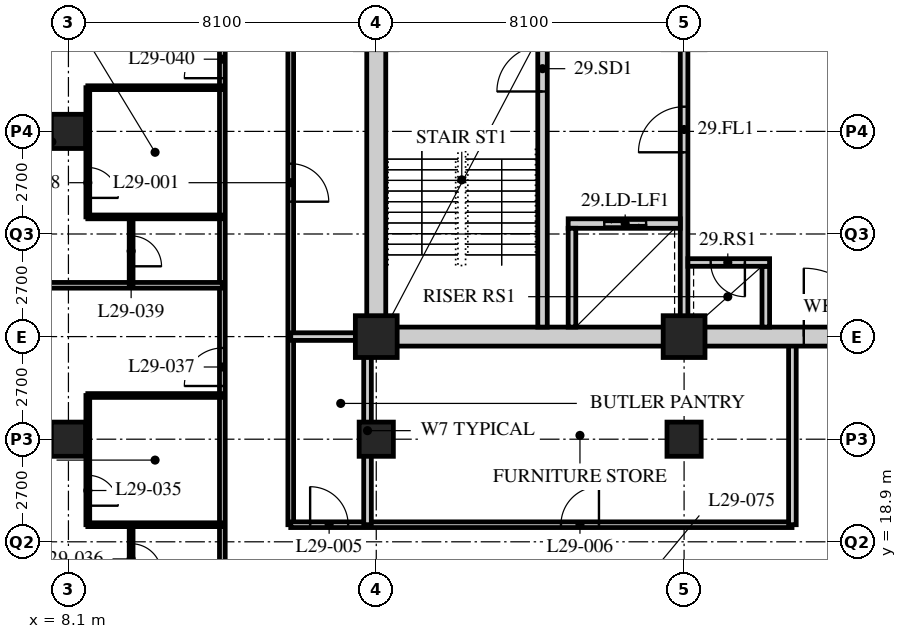
"""IFC4 building model, lengths in metres.
Left out: names, types, materials, properties, quantities, classifications, styles, units other than length and angle.
Written with IfcOpenShell. Run it as: python <this file> out.ifc"""

import sys

from ifc_helpers import new_model, si_unit, direction, frame, frame_2d, origin, origin_2d, place, context, subcontext, project, spatial, rectangle, hollow_rectangle, extrude, element, fill, save


model = new_model("IFC4")
c1 = context("Model", 3, precision=1e-05, world=origin(), true_north=direction((0.0, 1.0)))
c2 = subcontext(c1, "Body", "Model", "MODEL_VIEW")
j1 = project(units=[si_unit("LENGTHUNIT", "METRE"), si_unit("PLANEANGLEUNIT", "RADIAN")], contexts=[c1])
p1 = place(None, origin())
s1 = spatial("IfcSite", under=j1, at=p1, CompositionType="ELEMENT")
p2 = place(p1, origin())
s2 = spatial("IfcBuilding", under=s1, at=p2, CompositionType="ELEMENT")
p3 = place(p2, frame((0.0, 0.0, 117.0)))
s3 = spatial("IfcBuildingStorey", under=s2, at=p3, CompositionType="ELEMENT", Elevation=117.0)
for number, where, z_axis, x_axis in (
    (1, (8.1, 21.6, 0.0), (0.0, 0.0, 1.0), (1.0, 0.0, 0.0)),
    (2, (8.1, 29.7, 0.0), (0.0, 0.0, 1.0), (1.0, 0.0, 0.0)),
    (3, (16.2, 21.6, 0.0), (0.0, 0.0, 1.0), (1.0, 0.0, 0.0)),
):
    element("IfcColumn", number, at=place(p3, frame(where, z_axis=z_axis, x_axis=x_axis)), inside=s3, PredefinedType="COLUMN", context=c2, shape_type="SweptSolid", body=[
        extrude(hollow_rectangle(XDim=0.9, YDim=0.9, WallThickness=0.09, at=origin_2d()), origin(), (0.0, 0.0, 1.0), 3.4),
    ])
p4 = place(p3, frame((16.2, 24.3, 0.0), z_axis=(0.0, 0.0, 1.0), x_axis=(1.0, 0.0, 0.0)))
e4 = element("IfcColumn", 4, at=p4, inside=s3, PredefinedType="COLUMN", context=c2, shape_type="SweptSolid", body=[
    extrude(hollow_rectangle(XDim=1.1, YDim=1.1, WallThickness=0.1, at=origin_2d()), origin(), (0.0, 0.0, 1.0), 3.4),
])
p5 = place(p3, frame((24.3, 21.6, 0.0), z_axis=(0.0, 0.0, 1.0), x_axis=(1.0, 0.0, 0.0)))
e5 = element("IfcColumn", 5, at=p5, inside=s3, PredefinedType="COLUMN", context=c2, shape_type="SweptSolid", body=[
    extrude(hollow_rectangle(XDim=0.9, YDim=0.9, WallThickness=0.09, at=origin_2d()), origin(), (0.0, 0.0, 1.0), 3.4),
])
p6 = place(p3, frame((24.3, 24.3, 0.0), z_axis=(0.0, 0.0, 1.0), x_axis=(1.0, 0.0, 0.0)))
e6 = element("IfcColumn", 6, at=p6, inside=s3, PredefinedType="COLUMN", context=c2, shape_type="SweptSolid", body=[
    extrude(hollow_rectangle(XDim=1.1, YDim=1.1, WallThickness=0.1, at=origin_2d()), origin(), (0.0, 0.0, 1.0), 3.4),
])
p7 = place(p3, frame((12.15, 17.55, 0.0), z_axis=(0.0, 0.0, 1.0), x_axis=(0.0, 1.0, 0.0)))
e7 = element("IfcWall", 7, at=p7, inside=s3, PredefinedType="PARTITIONING", context=c2, shape_type="SweptSolid", body=[
    extrude(rectangle(XDim=28.35, YDim=0.15, at=frame_2d((14.175, 0.0))), origin(), (0.0, 0.0, 1.0), 3.19),
])
p8 = place(p7, frame((5.45, 0.0, 0.0)))
e8 = element("IfcOpeningElement", 8, at=p8, cuts=e7, PredefinedType="OPENING", context=c2, shape_type="SweptSolid", body=[
    extrude(rectangle(XDim=1.0, YDim=2.1, at=frame_2d((0.5, 1.05))), frame((0.0, 0.085, 0.0), z_axis=(0.0, -1.0, 0.0), x_axis=(1.0, 0.0, 0.0)), (0.0, 0.0, 1.0), 0.17),
])
p9 = place(p7, frame((13.55, 0.0, 0.0)))
e9 = element("IfcOpeningElement", 9, at=p9, cuts=e7, PredefinedType="OPENING", context=c2, shape_type="SweptSolid", body=[
    extrude(rectangle(XDim=1.0, YDim=2.1, at=frame_2d((0.5, 1.05))), frame((0.0, 0.085, 0.0), z_axis=(0.0, -1.0, 0.0), x_axis=(1.0, 0.0, 0.0)), (0.0, 0.0, 1.0), 0.17),
])
p10 = place(p7, frame((21.65, 0.0, 0.0)))
e10 = element("IfcOpeningElement", 10, at=p10, cuts=e7, PredefinedType="OPENING", context=c2, shape_type="SweptSolid", body=[
    extrude(rectangle(XDim=1.0, YDim=2.1, at=frame_2d((0.5, 1.05))), frame((0.0, 0.085, 0.0), z_axis=(0.0, -1.0, 0.0), x_axis=(1.0, 0.0, 0.0)), (0.0, 0.0, 1.0), 0.17),
])
p11 = place(p7, frame((26.75, 0.0, 0.0)))
e11 = element("IfcOpeningElement", 11, at=p11, cuts=e7, PredefinedType="OPENING", context=c2, shape_type="SweptSolid", body=[
    extrude(rectangle(XDim=1.0, YDim=2.1, at=frame_2d((0.5, 1.05))), frame((0.0, 0.085, 0.0), z_axis=(0.0, -1.0, 0.0), x_axis=(1.0, 0.0, 0.0)), (0.0, 0.0, 1.0), 0.17),
])
p12 = place(p3, frame((13.95, 44.1, 0.0), z_axis=(0.0, 0.0, 1.0), x_axis=(0.0, -1.0, 0.0)))
e12 = element("IfcWall", 12, at=p12, inside=s3, PredefinedType="PARTITIONING", context=c2, shape_type="SweptSolid", body=[
    extrude(rectangle(XDim=24.75, YDim=0.15, at=frame_2d((12.375, 0.0))), origin(), (0.0, 0.0, 1.0), 3.19),
])
p13 = place(p12, frame((15.25, 0.0, 0.0)))
e13 = element("IfcOpeningElement", 13, at=p13, cuts=e12, PredefinedType="OPENING", context=c2, shape_type="SweptSolid", body=[
    extrude(rectangle(XDim=1.0, YDim=2.1, at=frame_2d((0.5, 1.05))), frame((0.0, 0.085, 0.0), z_axis=(0.0, -1.0, 0.0), x_axis=(1.0, 0.0, 0.0)), (0.0, 0.0, 1.0), 0.17),
])
p14 = place(p12, frame((7.15, 0.0, 0.0)))
e14 = element("IfcOpeningElement", 14, at=p14, cuts=e12, PredefinedType="OPENING", context=c2, shape_type="SweptSolid", body=[
    extrude(rectangle(XDim=1.0, YDim=2.1, at=frame_2d((0.5, 1.05))), frame((0.0, 0.085, 0.0), z_axis=(0.0, -1.0, 0.0), x_axis=(1.0, 0.0, 0.0)), (0.0, 0.0, 1.0), 0.17),
])
p15 = place(p3, frame((13.95, 19.35, 0.0), z_axis=(0.0, 0.0, 1.0), x_axis=(1.0, 0.0, 0.0)))
e15 = element("IfcWall", 15, at=p15, inside=s3, PredefinedType="PARTITIONING", context=c2, shape_type="SweptSolid", body=[
    extrude(rectangle(XDim=13.19, YDim=0.15, at=frame_2d((6.595, 0.0))), origin(), (0.0, 0.0, 1.0), 3.19),
])
p16 = place(p15, frame((0.51, 0.0, 0.0)))
e16 = element("IfcOpeningElement", 16, at=p16, cuts=e15, PredefinedType="OPENING", context=c2, shape_type="SweptSolid", body=[
    extrude(rectangle(XDim=1.0, YDim=2.1, at=frame_2d((0.5, 1.05))), frame((0.0, 0.085, 0.0), z_axis=(0.0, -1.0, 0.0), x_axis=(1.0, 0.0, 0.0)), (0.0, 0.0, 1.0), 0.17),
])
p17 = place(p15, frame((7.11, 0.0, 0.0)))
e17 = element("IfcOpeningElement", 17, at=p17, cuts=e15, PredefinedType="OPENING", context=c2, shape_type="SweptSolid", body=[
    extrude(rectangle(XDim=1.0, YDim=2.1, at=frame_2d((0.5, 1.05))), frame((0.0, 0.085, 0.0), z_axis=(0.0, -1.0, 0.0), x_axis=(1.0, 0.0, 0.0)), (0.0, 0.0, 1.0), 0.17),
])
p18 = place(p3, frame((15.97, 19.35, 0.0), z_axis=(0.0, 0.0, 1.0), x_axis=(0.0, 1.0, 0.0)))
e18 = element("IfcWall", 18, at=p18, inside=s3, PredefinedType="SOLIDWALL", context=c2, shape_type="SweptSolid", body=[
    extrude(rectangle(XDim=4.95, YDim=0.2, at=frame_2d((2.475, 0.0))), origin(), (0.0, 0.0, 1.0), 2.49),
])
p19 = place(p3, frame((27.15, 19.35, 0.0), z_axis=(0.0, 0.0, 1.0), x_axis=(0.0, 1.0, 0.0)))
e19 = element("IfcWall", 19, at=p19, inside=s3, PredefinedType="SOLIDWALL", context=c2, shape_type="SweptSolid", body=[
    extrude(rectangle(XDim=4.95, YDim=0.2, at=frame_2d((2.475, 0.0))), origin(), (0.0, 0.0, 1.0), 3.19),
])
p20 = place(p3, frame((13.95, 24.3, 0.0), z_axis=(0.0, 0.0, 1.0), x_axis=(1.0, 0.0, 0.0)))
e20 = element("IfcWall", 20, at=p20, inside=s3, PredefinedType="SOLIDWALL", context=c2, shape_type="SweptSolid", body=[
    extrude(rectangle(XDim=2.25, YDim=0.2, at=frame_2d((1.125, 0.0))), origin(), (0.0, 0.0, 1.0), 3.19),
])
p21 = place(p3, frame((8.61, 19.35, 0.0), z_axis=(0.0, 0.0, 1.0), x_axis=(0.0, 1.0, 0.0)))
e21 = element("IfcWall", 21, at=p21, inside=s3, PredefinedType="PARTITIONING", context=c2, shape_type="SweptSolid", body=[
    extrude(rectangle(XDim=3.4, YDim=0.1, at=frame_2d((1.7, 0.0))), origin(), (0.0, 0.0, 1.0), 3.19),
])
p22 = place(p21, frame((0.5, 0.0, 0.0)))
e22 = element("IfcOpeningElement", 22, at=p22, cuts=e21, PredefinedType="OPENING", context=c2, shape_type="SweptSolid", body=[
    extrude(rectangle(XDim=0.8, YDim=2.1, at=frame_2d((0.4, 1.05))), frame((0.0, 0.06, 0.0), z_axis=(0.0, -1.0, 0.0), x_axis=(1.0, 0.0, 0.0)), (0.0, 0.0, 1.0), 0.12),
])
p23 = place(p3, frame((9.75, 17.55, 0.0), z_axis=(0.0, 0.0, 1.0), x_axis=(0.0, 1.0, 0.0)))
e23 = element("IfcWall", 23, at=p23, inside=s3, PredefinedType="PARTITIONING", context=c2, shape_type="SweptSolid", body=[
    extrude(rectangle(XDim=1.8, YDim=0.1, at=frame_2d((0.9, 0.0))), origin(), (0.0, 0.0, 1.0), 3.19),
])
p24 = place(p23, frame((0.5, 0.0, 0.0)))
e24 = element("IfcOpeningElement", 24, at=p24, cuts=e23, PredefinedType="OPENING", context=c2, shape_type="SweptSolid", body=[
    extrude(rectangle(XDim=0.8, YDim=2.1, at=frame_2d((0.4, 1.05))), frame((0.0, 0.06, 0.0), z_axis=(0.0, -1.0, 0.0), x_axis=(1.0, 0.0, 0.0)), (0.0, 0.0, 1.0), 0.12),
])
for number, where, z_axis, x_axis in (
    (25, (12.15, 19.35, 0.0), (0.0, 0.0, 1.0), (-1.0, 0.0, 0.0)),
    (26, (12.15, 22.75, 0.0), (0.0, 0.0, 1.0), (-1.0, 0.0, 0.0)),
):
    element("IfcWall", number, at=place(p3, frame(where, z_axis=z_axis, x_axis=x_axis)), inside=s3, PredefinedType="PARTITIONING", context=c2, shape_type="SweptSolid", body=[
        extrude(rectangle(XDim=3.54, YDim=0.1, at=frame_2d((1.77, 0.0))), origin(), (0.0, 0.0, 1.0), 3.19),
    ])
p25 = place(p3, frame((12.15, 25.65, 0.0), z_axis=(0.0, 0.0, 1.0), x_axis=(-1.0, 0.0, 0.0)))
e27 = element("IfcWall", 27, at=p25, inside=s3, PredefinedType="PARTITIONING", context=c2, shape_type="SweptSolid", body=[
    extrude(rectangle(XDim=11.85, YDim=0.15, at=frame_2d((5.925, 0.0))), origin(), (0.0, 0.0, 1.0), 3.19),
])
p26 = place(p3, frame((8.61, 27.45, 0.0), z_axis=(0.0, 0.0, 1.0), x_axis=(0.0, 1.0, 0.0)))
e28 = element("IfcWall", 28, at=p26, inside=s3, PredefinedType="PARTITIONING", context=c2, shape_type="SweptSolid", body=[
    extrude(rectangle(XDim=3.4, YDim=0.1, at=frame_2d((1.7, 0.0))), origin(), (0.0, 0.0, 1.0), 3.19),
])
p27 = place(p26, frame((0.5, 0.0, 0.0)))
e29 = element("IfcOpeningElement", 29, at=p27, cuts=e28, PredefinedType="OPENING", context=c2, shape_type="SweptSolid", body=[
    extrude(rectangle(XDim=0.8, YDim=2.1, at=frame_2d((0.4, 1.05))), frame((0.0, 0.06, 0.0), z_axis=(0.0, -1.0, 0.0), x_axis=(1.0, 0.0, 0.0)), (0.0, 0.0, 1.0), 0.12),
])
p28 = place(p3, frame((9.75, 25.65, 0.0), z_axis=(0.0, 0.0, 1.0), x_axis=(0.0, 1.0, 0.0)))
e30 = element("IfcWall", 30, at=p28, inside=s3, PredefinedType="PARTITIONING", context=c2, shape_type="SweptSolid", body=[
    extrude(rectangle(XDim=1.8, YDim=0.1, at=frame_2d((0.9, 0.0))), origin(), (0.0, 0.0, 1.0), 3.19),
])
p29 = place(p28, frame((0.5, 0.0, 0.0)))
e31 = element("IfcOpeningElement", 31, at=p29, cuts=e30, PredefinedType="OPENING", context=c2, shape_type="SweptSolid", body=[
    extrude(rectangle(XDim=0.8, YDim=2.1, at=frame_2d((0.4, 1.05))), frame((0.0, 0.06, 0.0), z_axis=(0.0, -1.0, 0.0), x_axis=(1.0, 0.0, 0.0)), (0.0, 0.0, 1.0), 0.12),
])
for number, where, z_axis, x_axis in (
    (32, (12.15, 27.45, 0.0), (0.0, 0.0, 1.0), (-1.0, 0.0, 0.0)),
    (33, (12.15, 30.85, 0.0), (0.0, 0.0, 1.0), (-1.0, 0.0, 0.0)),
):
    element("IfcWall", number, at=place(p3, frame(where, z_axis=z_axis, x_axis=x_axis)), inside=s3, PredefinedType="PARTITIONING", context=c2, shape_type="SweptSolid", body=[
        extrude(rectangle(XDim=3.54, YDim=0.1, at=frame_2d((1.77, 0.0))), origin(), (0.0, 0.0, 1.0), 3.19),
    ])
p30 = place(p3, frame((15.95, 24.3, 0.0), z_axis=(0.0, 0.0, 1.0), x_axis=(1.0, 0.0, 0.0)))
e34 = element("IfcWall", 34, at=p30, inside=s3, PredefinedType="SOLIDWALL", context=c2, shape_type="SweptSolid", body=[
    extrude(rectangle(XDim=24.8, YDim=0.5, at=frame_2d((12.4, 0.0))), origin(), (0.0, 0.0, 1.0), 2.54),
])
p31 = place(p30, frame((11.5, 0.0, 0.0)))
e35 = element("IfcOpeningElement", 35, at=p31, cuts=e34, PredefinedType="OPENING", context=c2, shape_type="SweptSolid", body=[
    extrude(rectangle(XDim=1.8, YDim=2.4, at=frame_2d((0.9, 1.2))), frame((0.0, 0.26, 0.0), z_axis=(0.0, -1.0, 0.0), x_axis=(1.0, 0.0, 0.0)), (0.0, 0.0, 1.0), 0.52),
])
p32 = place(p3, frame((16.2, 24.55, 0.0), z_axis=(0.0, 0.0, 1.0), x_axis=(0.0, 1.0, 0.0)))
e36 = element("IfcWall", 36, at=p32, inside=s3, PredefinedType="SOLIDWALL", context=c2, shape_type="SweptSolid", body=[
    extrude(rectangle(XDim=15.7, YDim=0.5, at=frame_2d((7.85, 0.0))), origin(), (0.0, 0.0, 1.0), 2.578),
])
p33 = place(p3, frame((24.3, 24.55, 0.0), z_axis=(0.0, 0.0, 1.0), x_axis=(0.0, 1.0, 0.0)))
e37 = element("IfcWall", 37, at=p33, inside=s3, PredefinedType="SOLIDWALL", context=c2, shape_type="SweptSolid", body=[
    extrude(rectangle(XDim=7.75, YDim=0.2, at=frame_2d((3.875, 0.0))), origin(), (0.0, 0.0, 1.0), 2.578),
])
p34 = place(p33, frame((4.6, 0.0, 0.0)))
e38 = element("IfcOpeningElement", 38, at=p34, cuts=e37, PredefinedType="OPENING", context=c2, shape_type="SweptSolid", body=[
    extrude(rectangle(XDim=1.2, YDim=2.1, at=frame_2d((0.6, 1.05))), frame((0.0, 0.11, 0.0), z_axis=(0.0, -1.0, 0.0), x_axis=(1.0, 0.0, 0.0)), (0.0, 0.0, 1.0), 0.22),
])
p35 = place(p3, frame((20.575, 24.55, 0.0), z_axis=(0.0, 0.0, 1.0), x_axis=(0.0, 1.0, 0.0)))
e39 = element("IfcWall", 39, at=p35, inside=s3, PredefinedType="SOLIDWALL", context=c2, shape_type="SweptSolid", body=[
    extrude(rectangle(XDim=7.75, YDim=0.25, at=frame_2d((3.875, 0.0))), origin(), (0.0, 0.0, 1.0), 3.19),
])
p36 = place(p35, frame((6.2, 0.0, 0.0)))
e40 = element("IfcOpeningElement", 40, at=p36, cuts=e39, PredefinedType="OPENING", context=c2, shape_type="SweptSolid", body=[
    extrude(rectangle(XDim=1.2, YDim=2.1, at=frame_2d((0.6, 1.05))), frame((0.0, 0.135, 0.0), z_axis=(0.0, -1.0, 0.0), x_axis=(1.0, 0.0, 0.0)), (0.0, 0.0, 1.0), 0.27),
])
p37 = place(p3, frame((21.25, 27.275, 0.0), z_axis=(0.0, 0.0, 1.0), x_axis=(1.0, 0.0, 0.0)))
e41 = element("IfcWall", 41, at=p37, inside=s3, PredefinedType="SOLIDWALL", context=c2, shape_type="SweptSolid", body=[
    extrude(rectangle(XDim=2.95, YDim=0.25, at=frame_2d((1.475, 0.0))), origin(), (0.0, 0.0, 1.0), 3.19),
])
p38 = place(p37, frame((0.95, 0.0, 0.0)))
e42 = element("IfcOpeningElement", 42, at=p38, cuts=e41, PredefinedType="OPENING", context=c2, shape_type="SweptSolid", body=[
    extrude(rectangle(XDim=1.1, YDim=2.4, at=frame_2d((0.55, 1.2))), frame((0.0, 0.135, 0.0), z_axis=(0.0, -1.0, 0.0), x_axis=(1.0, 0.0, 0.0)), (0.0, 0.0, 1.0), 0.27),
])
p39 = place(p3, frame((21.35, 24.55, 0.0), z_axis=(0.0, 0.0, 1.0), x_axis=(0.0, 1.0, 0.0)))
e43 = element("IfcWall", 43, at=p39, inside=s3, PredefinedType="SOLIDWALL", context=c2, shape_type="SweptSolid", body=[
    extrude(rectangle(XDim=2.6, YDim=0.2, at=frame_2d((1.3, 0.0))), origin(), (0.0, 0.0, 1.0), 3.19),
])
p40 = place(p3, frame((26.45, 24.55, 0.0), z_axis=(0.0, 0.0, 1.0), x_axis=(0.0, 1.0, 0.0)))
e44 = element("IfcWall", 44, at=p40, inside=s3, PredefinedType="SOLIDWALL", context=c2, shape_type="SweptSolid", body=[
    extrude(rectangle(XDim=1.6, YDim=0.2, at=frame_2d((0.8, 0.0))), origin(), (0.0, 0.0, 1.0), 3.19),
])
p41 = place(p3, frame((24.4, 26.25, 0.0), z_axis=(0.0, 0.0, 1.0), x_axis=(1.0, 0.0, 0.0)))
e45 = element("IfcWall", 45, at=p41, inside=s3, PredefinedType="SOLIDWALL", context=c2, shape_type="SweptSolid", body=[
    extrude(rectangle(XDim=2.15, YDim=0.2, at=frame_2d((1.075, 0.0))), origin(), (0.0, 0.0, 1.0), 3.19),
])
p42 = place(p41, frame((0.6, 0.0, 0.0)))
e46 = element("IfcOpeningElement", 46, at=p42, cuts=e45, PredefinedType="OPENING", context=c2, shape_type="SweptSolid", body=[
    extrude(rectangle(XDim=0.9, YDim=2.1, at=frame_2d((0.45, 1.05))), frame((0.0, 0.11, 0.0), z_axis=(0.0, -1.0, 0.0), x_axis=(1.0, 0.0, 0.0)), (0.0, 0.0, 1.0), 0.22),
])
p43 = place(p13, origin())
e47 = element("IfcDoor", 47, at=p43, inside=s3, OperationType="SINGLE_SWING_RIGHT", PredefinedType="DOOR", context=c2, shape_type="SweptSolid", body=[
    extrude(rectangle(XDim=1.0, YDim=2.1, at=frame_2d((0.5, 1.05))), frame((0.0, 0.025, 0.0), z_axis=(0.0, -1.0, 0.0), x_axis=(1.0, 0.0, 0.0)), (0.0, 0.0, 1.0), 0.05),
])
fill(e13, e47)
p44 = place(p16, origin())
e48 = element("IfcDoor", 48, at=p44, inside=s3, OperationType="SINGLE_SWING_LEFT", PredefinedType="DOOR", context=c2, shape_type="SweptSolid", body=[
    extrude(rectangle(XDim=1.0, YDim=2.1, at=frame_2d((0.5, 1.05))), frame((0.0, 0.025, 0.0), z_axis=(0.0, -1.0, 0.0), x_axis=(1.0, 0.0, 0.0)), (0.0, 0.0, 1.0), 0.05),
])
fill(e16, e48)
p45 = place(p17, origin())
e49 = element("IfcDoor", 49, at=p45, inside=s3, OperationType="SINGLE_SWING_RIGHT", PredefinedType="DOOR", context=c2, shape_type="SweptSolid", body=[
    extrude(rectangle(XDim=1.0, YDim=2.1, at=frame_2d((0.5, 1.05))), frame((0.0, 0.025, 0.0), z_axis=(0.0, -1.0, 0.0), x_axis=(1.0, 0.0, 0.0)), (0.0, 0.0, 1.0), 0.05),
])
fill(e17, e49)
p46 = place(p22, origin())
e50 = element("IfcDoor", 50, at=p46, inside=s3, OperationType="SINGLE_SWING_RIGHT", PredefinedType="DOOR", context=c2, shape_type="SweptSolid", body=[
    extrude(rectangle(XDim=0.8, YDim=2.1, at=frame_2d((0.4, 1.05))), frame((0.0, 0.025, 0.0), z_axis=(0.0, -1.0, 0.0), x_axis=(1.0, 0.0, 0.0)), (0.0, 0.0, 1.0), 0.05),
])
fill(e22, e50)
p47 = place(p24, origin())
e51 = element("IfcDoor", 51, at=p47, inside=s3, OperationType="SINGLE_SWING_RIGHT", PredefinedType="DOOR", context=c2, shape_type="SweptSolid", body=[
    extrude(rectangle(XDim=0.8, YDim=2.1, at=frame_2d((0.4, 1.05))), frame((0.0, 0.025, 0.0), z_axis=(0.0, -1.0, 0.0), x_axis=(1.0, 0.0, 0.0)), (0.0, 0.0, 1.0), 0.05),
])
fill(e24, e51)
p48 = place(p8, origin())
e52 = element("IfcDoor", 52, at=p48, inside=s3, OperationType="SINGLE_SWING_LEFT", PredefinedType="DOOR", context=c2, shape_type="SweptSolid", body=[
    extrude(rectangle(XDim=1.0, YDim=2.1, at=frame_2d((0.5, 1.05))), frame((0.0, 0.025, 0.0), z_axis=(0.0, -1.0, 0.0), x_axis=(1.0, 0.0, 0.0)), (0.0, 0.0, 1.0), 0.05),
])
fill(e8, e52)
p49 = place(p27, origin())
e53 = element("IfcDoor", 53, at=p49, inside=s3, OperationType="SINGLE_SWING_RIGHT", PredefinedType="DOOR", context=c2, shape_type="SweptSolid", body=[
    extrude(rectangle(XDim=0.8, YDim=2.1, at=frame_2d((0.4, 1.05))), frame((0.0, 0.025, 0.0), z_axis=(0.0, -1.0, 0.0), x_axis=(1.0, 0.0, 0.0)), (0.0, 0.0, 1.0), 0.05),
])
fill(e29, e53)
p50 = place(p29, origin())
e54 = element("IfcDoor", 54, at=p50, inside=s3, OperationType="SINGLE_SWING_RIGHT", PredefinedType="DOOR", context=c2, shape_type="SweptSolid", body=[
    extrude(rectangle(XDim=0.8, YDim=2.1, at=frame_2d((0.4, 1.05))), frame((0.0, 0.025, 0.0), z_axis=(0.0, -1.0, 0.0), x_axis=(1.0, 0.0, 0.0)), (0.0, 0.0, 1.0), 0.05),
])
fill(e31, e54)
p51 = place(p9, origin())
e55 = element("IfcDoor", 55, at=p51, inside=s3, OperationType="SINGLE_SWING_LEFT", PredefinedType="DOOR", context=c2, shape_type="SweptSolid", body=[
    extrude(rectangle(XDim=1.0, YDim=2.1, at=frame_2d((0.5, 1.05))), frame((0.0, 0.025, 0.0), z_axis=(0.0, -1.0, 0.0), x_axis=(1.0, 0.0, 0.0)), (0.0, 0.0, 1.0), 0.05),
])
fill(e9, e55)
p52 = place(p36, origin())
e56 = element("IfcDoor", 56, at=p52, inside=s3, OperationType="SINGLE_SWING_LEFT", PredefinedType="DOOR", context=c2, shape_type="SweptSolid", body=[
    extrude(rectangle(XDim=1.2, YDim=2.1, at=frame_2d((0.6, 1.05))), frame((0.0, 0.025, 0.0), z_axis=(0.0, -1.0, 0.0), x_axis=(1.0, 0.0, 0.0)), (0.0, 0.0, 1.0), 0.05),
])
fill(e40, e56)
p53 = place(p34, origin())
e57 = element("IfcDoor", 57, at=p53, inside=s3, OperationType="SINGLE_SWING_LEFT", PredefinedType="DOOR", context=c2, shape_type="SweptSolid", body=[
    extrude(rectangle(XDim=1.2, YDim=2.1, at=frame_2d((0.6, 1.05))), frame((0.0, 0.025, 0.0), z_axis=(0.0, -1.0, 0.0), x_axis=(1.0, 0.0, 0.0)), (0.0, 0.0, 1.0), 0.05),
])
fill(e38, e57)
p54 = place(p42, origin())
e58 = element("IfcDoor", 58, at=p54, inside=s3, OperationType="SINGLE_SWING_LEFT", PredefinedType="DOOR", context=c2, shape_type="SweptSolid", body=[
    extrude(rectangle(XDim=0.9, YDim=2.1, at=frame_2d((0.45, 1.05))), frame((0.0, 0.025, 0.0), z_axis=(0.0, -1.0, 0.0), x_axis=(1.0, 0.0, 0.0)), (0.0, 0.0, 1.0), 0.05),
])
fill(e46, e58)
p55 = place(p38, origin())
e59 = element("IfcDoor", 59, at=p55, inside=s3, OperationType="DOUBLE_DOOR_SLIDING", PredefinedType="DOOR", context=c2, shape_type="SweptSolid", body=[
    extrude(rectangle(XDim=1.1, YDim=2.4, at=frame_2d((0.55, 1.2))), frame((0.0, 0.025, 0.0), z_axis=(0.0, -1.0, 0.0), x_axis=(1.0, 0.0, 0.0)), (0.0, 0.0, 1.0), 0.05),
])
fill(e42, e59)
p56 = place(p31, origin())
e60 = element("IfcDoor", 60, at=p56, inside=s3, OperationType="DOUBLE_DOOR_SINGLE_SWING", PredefinedType="DOOR", context=c2, shape_type="SweptSolid", body=[
    extrude(rectangle(XDim=1.8, YDim=2.4, at=frame_2d((0.9, 1.2))), frame((0.0, 0.025, 0.0), z_axis=(0.0, -1.0, 0.0), x_axis=(1.0, 0.0, 0.0)), (0.0, 0.0, 1.0), 0.05),
])
fill(e35, e60)
save(model, sys.argv[1])
